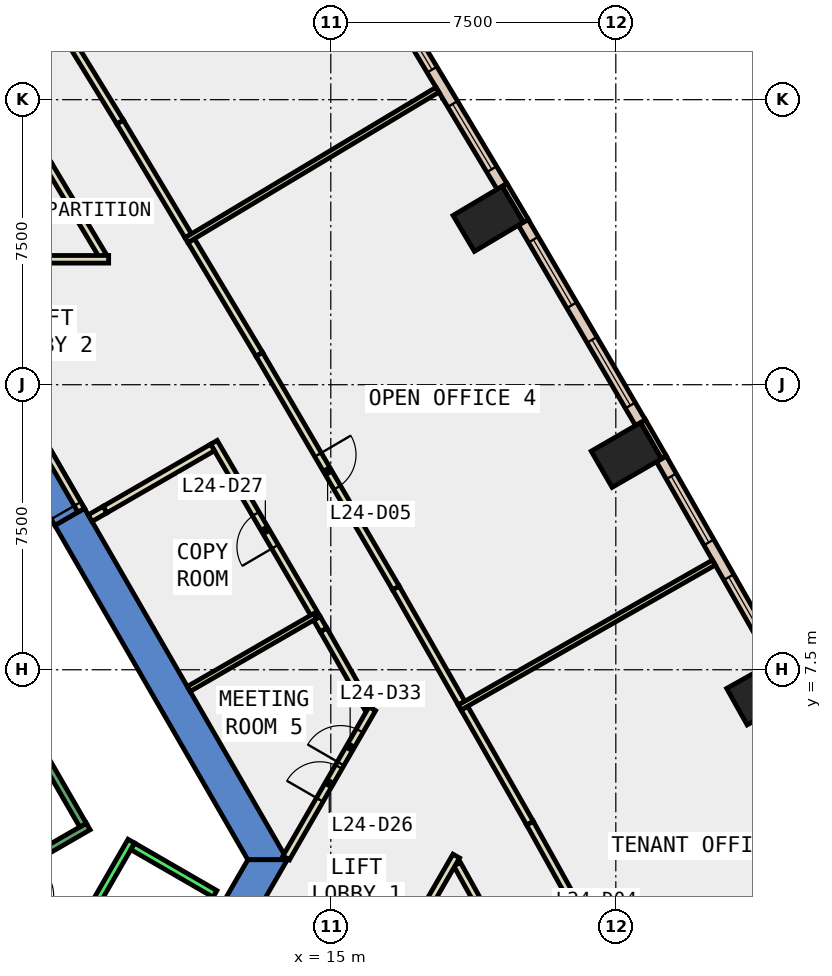
"""IFC4 building model, lengths in metres.
Left out: names, types, materials, properties, quantities, classifications, styles, units other than length and angle.
Written with IfcOpenShell. Run it as: python <this file> out.ifc"""

import sys

from ifc_helpers import new_model, si_unit, direction, frame, frame_2d, origin, origin_2d, place, context, subcontext, project, spatial, polyline, rectangle, outline, extrude, element, fill, save


model = new_model("IFC4")
c1 = context("Model", 3, precision=1e-05, world=origin(), true_north=direction((0.0, 1.0)))
c2 = subcontext(c1, "Body", "Model", "MODEL_VIEW")
j1 = project(units=[si_unit("LENGTHUNIT", "METRE"), si_unit("PLANEANGLEUNIT", "RADIAN")], contexts=[c1])
p1 = place(None, origin())
s1 = spatial("IfcSite", under=j1, at=p1, CompositionType="ELEMENT")
p2 = place(p1, origin())
s2 = spatial("IfcBuilding", under=s1, at=p2, CompositionType="ELEMENT")
p3 = place(p2, frame((0.0, 0.0, 111.8)))
s3 = spatial("IfcBuildingStorey", under=s2, at=p3, CompositionType="ELEMENT", Elevation=111.8)
for number, where, z_axis, x_axis in (
    (1, (26.341, 6.896, -0.4), (0.0, 0.0, 1.0), (-0.49, 0.872, 0.0)),
    (2, (22.777, 13.15, -0.4), (0.0, 0.0, 1.0), (-0.5, 0.866, 0.0)),
    (3, (19.143, 19.364, -0.4), (0.0, 0.0, 1.0), (-0.51, 0.86, 0.0)),
):
    element("IfcColumn", number, at=place(p3, frame(where, z_axis=z_axis, x_axis=x_axis)), inside=s3, PredefinedType="COLUMN", context=c2, shape_type="SweptSolid", body=[
        extrude(rectangle(XDim=1.1, YDim=1.5, at=origin_2d()), origin(), (0.0, 0.0, 1.0), 4.2),
    ])
p4 = place(p3, frame((0.0, 0.0, -0.4)))
e4 = element("IfcWall", 4, at=p4, inside=s3, PredefinedType="SHEAR", context=c2, shape_type="SweptSolid", body=[
    extrude(outline(polyline([(8.517, 11.748), (7.738, 11.298), (12.817, 2.5), (13.856, 2.5), (8.517, 11.748)])), origin(), (0.0, 0.0, 1.0), 4.2),
])
p5 = place(p3, frame((0.0, 0.0, 3.6)))
e5 = element("IfcWall", 5, at=p5, inside=s3, PredefinedType="SHEAR", context=c2, shape_type="SweptSolid", body=[
    extrude(outline(polyline([(7.517, 13.48), (6.738, 13.03), (7.738, 11.298), (8.517, 11.748), (7.517, 13.48)])), origin(), (0.0, 0.0, 1.0), 0.2),
])
p6 = place(p3, frame((0.0, 0.0, -0.4)))
e6 = element("IfcWall", 6, at=p6, inside=s3, PredefinedType="SHEAR", context=c2, shape_type="SweptSolid", body=[
    extrude(outline(polyline([(11.888, 0.89), (12.667, 0.44), (13.856, 2.5), (12.817, 2.5), (11.888, 0.89)])), origin(), (0.0, 0.0, 1.0), 4.2),
])
p7 = place(p3, frame((23.766, 13.086, 0.0), z_axis=(0.0, 0.0, 1.0), x_axis=(-0.499837685251, 0.86611909597, 0.0)))
e7 = element("IfcWall", 7, at=p7, inside=s3, PredefinedType="STANDARD", context=c2, shape_type="SweptSolid", body=[
    extrude(rectangle(XDim=1.1, YDim=0.15, at=frame_2d((0.55, 0.0))), origin(), (0.0, 0.0, 1.0), 3.8),
])
p8 = place(p3, frame((20.133, 19.312, 0.0), z_axis=(0.0, 0.0, 1.0), x_axis=(-0.510082245696, 0.860125631885, 0.0)))
e8 = element("IfcWall", 8, at=p8, inside=s3, PredefinedType="STANDARD", context=c2, shape_type="SweptSolid", body=[
    extrude(rectangle(XDim=1.1, YDim=0.15, at=frame_2d((0.55, 0.0))), origin(), (0.0, 0.0, 1.0), 3.8),
])
p9 = place(p3, frame((26.723, 7.74, 0.0), z_axis=(0.0, 0.0, 1.0), x_axis=(-0.495114366991, 0.868827810098, 0.0)))
e9 = element("IfcWall", 9, at=p9, inside=s3, PredefinedType="STANDARD", context=c2, shape_type="SweptSolid", body=[
    extrude(rectangle(XDim=6.11, YDim=0.3, at=frame_2d((3.055, 0.0))), origin(), (0.0, 0.0, 1.0), 3.8),
])
p10 = place(p9, frame((0.527, 0.0, 0.9)))
e10 = element("IfcOpeningElement", 10, at=p10, cuts=e9, PredefinedType="OPENING", context=c2, shape_type="SweptSolid", body=[
    extrude(rectangle(XDim=2.0, YDim=2.6, at=frame_2d((1.0, 1.3))), frame((0.0, 0.16, 0.0), z_axis=(0.0, -1.0, 0.0), x_axis=(1.0, 0.0, 0.0)), (0.0, 0.0, 1.0), 0.32),
])
p11 = place(p9, frame((3.582, 0.0, 0.9)))
e11 = element("IfcOpeningElement", 11, at=p11, cuts=e9, PredefinedType="OPENING", context=c2, shape_type="SweptSolid", body=[
    extrude(rectangle(XDim=2.0, YDim=2.6, at=frame_2d((1.0, 1.3))), frame((0.0, 0.16, 0.0), z_axis=(0.0, -1.0, 0.0), x_axis=(1.0, 0.0, 0.0)), (0.0, 0.0, 1.0), 0.32),
])
p12 = place(p3, frame((23.149, 13.999, 0.0), z_axis=(0.0, 0.0, 1.0), x_axis=(-0.504790055126, 0.863242144619, 0.0)))
e12 = element("IfcWall", 12, at=p12, inside=s3, PredefinedType="STANDARD", context=c2, shape_type="SweptSolid", body=[
    extrude(rectangle(XDim=6.109, YDim=0.3, at=frame_2d((3.055, 0.0))), origin(), (0.0, 0.0, 1.0), 3.8),
])
p13 = place(p12, frame((0.527, 0.0, 0.9)))
e13 = element("IfcOpeningElement", 13, at=p13, cuts=e12, PredefinedType="OPENING", context=c2, shape_type="SweptSolid", body=[
    extrude(rectangle(XDim=2.0, YDim=2.6, at=frame_2d((1.0, 1.3))), frame((0.0, 0.16, 0.0), z_axis=(0.0, -1.0, 0.0), x_axis=(1.0, 0.0, 0.0)), (0.0, 0.0, 1.0), 0.32),
])
p14 = place(p12, frame((3.582, 0.0, 0.9)))
e14 = element("IfcOpeningElement", 14, at=p14, cuts=e12, PredefinedType="OPENING", context=c2, shape_type="SweptSolid", body=[
    extrude(rectangle(XDim=2.0, YDim=2.6, at=frame_2d((1.0, 1.3))), frame((0.0, 0.16, 0.0), z_axis=(0.0, -1.0, 0.0), x_axis=(1.0, 0.0, 0.0)), (0.0, 0.0, 1.0), 0.32),
])
p15 = place(p3, frame((19.506, 20.217, 0.0), z_axis=(0.0, 0.0, 1.0), x_axis=(-0.514078503149, 0.857743139057, 0.0)))
e15 = element("IfcWall", 15, at=p15, inside=s3, PredefinedType="STANDARD", context=c2, shape_type="SweptSolid", body=[
    extrude(rectangle(XDim=6.11, YDim=0.3, at=frame_2d((3.055, 0.0))), origin(), (0.0, 0.0, 1.0), 3.8),
])
p16 = place(p15, frame((0.528, 0.0, 0.9)))
e16 = element("IfcOpeningElement", 16, at=p16, cuts=e15, PredefinedType="OPENING", context=c2, shape_type="SweptSolid", body=[
    extrude(rectangle(XDim=2.0, YDim=2.6, at=frame_2d((1.0, 1.3))), frame((0.0, 0.16, 0.0), z_axis=(0.0, -1.0, 0.0), x_axis=(1.0, 0.0, 0.0)), (0.0, 0.0, 1.0), 0.32),
])
p17 = place(p15, frame((3.583, 0.0, 0.9)))
e17 = element("IfcOpeningElement", 17, at=p17, cuts=e15, PredefinedType="OPENING", context=c2, shape_type="SweptSolid", body=[
    extrude(rectangle(XDim=2.0, YDim=2.6, at=frame_2d((1.0, 1.3))), frame((0.0, 0.16, 0.0), z_axis=(0.0, -1.0, 0.0), x_axis=(1.0, 0.0, 0.0)), (0.0, 0.0, 1.0), 0.32),
])
p18 = place(p3, frame((15.993, 6.473, 0.0), z_axis=(0.0, 0.0, 1.0), x_axis=(-0.495159881733, 0.86880187127, 0.0)))
e18 = element("IfcWall", 18, at=p18, inside=s3, PredefinedType="PARTITIONING", context=c2, shape_type="SweptSolid", body=[
    extrude(rectangle(XDim=2.391, YDim=0.2, at=frame_2d((1.195, 0.0))), origin(), (0.0, 0.0, 1.0), 3.8),
])
p19 = place(p3, frame((14.809, 8.55, 0.0), z_axis=(0.0, 0.0, 1.0), x_axis=(-0.50443330283, 0.86345066043, 0.0)))
e19 = element("IfcWall", 19, at=p19, inside=s3, PredefinedType="PARTITIONING", context=c2, shape_type="SweptSolid", body=[
    extrude(rectangle(XDim=0.351, YDim=0.2, at=frame_2d((0.175, 0.0))), origin(), (0.0, 0.0, 1.0), 3.8),
])
p20 = place(p3, frame((14.632, 8.853, 0.0), z_axis=(0.0, 0.0, 1.0), x_axis=(-0.504798859257, 0.863236996249, 0.0)))
e20 = element("IfcWall", 20, at=p20, inside=s3, PredefinedType="PARTITIONING", context=c2, shape_type="SweptSolid", body=[
    extrude(rectangle(XDim=5.365, YDim=0.2, at=frame_2d((2.682, 0.0))), origin(), (0.0, 0.0, 1.0), 3.8),
])
p21 = place(p20, frame((2.182, 0.0, 0.0)))
e21 = element("IfcOpeningElement", 21, at=p21, cuts=e20, PredefinedType="OPENING", context=c2, shape_type="SweptSolid", body=[
    extrude(rectangle(XDim=1.0, YDim=2.1, at=frame_2d((0.5, 1.05))), frame((0.0, 0.11, 0.0), z_axis=(0.0, -1.0, 0.0), x_axis=(1.0, 0.0, 0.0)), (0.0, 0.0, 1.0), 0.22),
])
p22 = place(p3, frame((11.888, 13.348, 0.0), z_axis=(0.0, 0.0, 1.0), x_axis=(-0.865959227195, -0.500114603702, 0.0)))
e22 = element("IfcWall", 22, at=p22, inside=s3, PredefinedType="PARTITIONING", context=c2, shape_type="SweptSolid", body=[
    extrude(rectangle(XDim=3.269, YDim=0.2, at=frame_2d((1.635, 0.0))), origin(), (0.0, 0.0, 1.0), 3.8),
])
p23 = place(p3, frame((9.003, 18.386, 0.0), z_axis=(0.0, 0.0, 1.0), x_axis=(-0.513900868925, 0.857849577092, 0.0)))
e23 = element("IfcWall", 23, at=p23, inside=s3, PredefinedType="PARTITIONING", context=c2, shape_type="SweptSolid", body=[
    extrude(rectangle(XDim=2.777, YDim=0.2, at=frame_2d((1.388, 0.0))), origin(), (0.0, 0.0, 1.0), 3.8),
])
p24 = place(p3, frame((21.773, -3.822, 0.0), z_axis=(0.0, 0.0, 1.0), x_axis=(-0.485826874234, 0.874055060206, 0.0)))
e24 = element("IfcWall", 24, at=p24, inside=s3, PredefinedType="PARTITIONING", context=c2, shape_type="SweptSolid", body=[
    extrude(rectangle(XDim=7.099, YDim=0.2, at=frame_2d((3.55, 0.0))), origin(), (0.0, 0.0, 1.0), 3.8),
])
p25 = place(p3, frame((18.515, 6.491, 0.0), z_axis=(0.0, 0.0, 1.0), x_axis=(0.495309264725, -0.868716715781, 0.0)))
e25 = element("IfcWall", 25, at=p25, inside=s3, PredefinedType="PARTITIONING", context=c2, shape_type="SweptSolid", body=[
    extrude(rectangle(XDim=3.487, YDim=0.2, at=frame_2d((1.743, 0.0))), origin(), (0.0, 0.0, 1.0), 3.8),
])
p26 = place(p3, frame((20.242, 3.462, 0.0), z_axis=(0.0, 0.0, 1.0), x_axis=(0.485742937917, -0.874101709336, 0.0)))
e26 = element("IfcWall", 26, at=p26, inside=s3, PredefinedType="PARTITIONING", context=c2, shape_type="SweptSolid", body=[
    extrude(rectangle(XDim=7.047, YDim=0.2, at=frame_2d((3.523, 0.0))), origin(), (0.0, 0.0, 1.0), 3.8),
])
p27 = place(p26, frame((3.099, 0.0, 0.0)))
e27 = element("IfcOpeningElement", 27, at=p27, cuts=e26, PredefinedType="OPENING", context=c2, shape_type="SweptSolid", body=[
    extrude(rectangle(XDim=1.0, YDim=2.1, at=frame_2d((0.5, 1.05))), frame((0.0, 0.11, 0.0), z_axis=(0.0, -1.0, 0.0), x_axis=(1.0, 0.0, 0.0)), (0.0, 0.0, 1.0), 0.22),
])
p28 = place(p3, frame((11.326, 18.79, 0.0), z_axis=(0.0, 0.0, 1.0), x_axis=(0.514155958966, -0.857696712049, 0.0)))
e28 = element("IfcWall", 28, at=p28, inside=s3, PredefinedType="PARTITIONING", context=c2, shape_type="SweptSolid", body=[
    extrude(rectangle(XDim=3.487, YDim=0.2, at=frame_2d((1.744, 0.0))), origin(), (0.0, 0.0, 1.0), 3.8),
])
p29 = place(p3, frame((13.119, 15.799, 0.0), z_axis=(0.0, 0.0, 1.0), x_axis=(0.504729598075, -0.863277494684, 0.0)))
e29 = element("IfcWall", 29, at=p29, inside=s3, PredefinedType="PARTITIONING", context=c2, shape_type="SweptSolid", body=[
    extrude(rectangle(XDim=7.123, YDim=0.2, at=frame_2d((3.562, 0.0))), origin(), (0.0, 0.0, 1.0), 3.8),
])
p30 = place(p29, frame((3.061, 0.0, 0.0)))
e30 = element("IfcOpeningElement", 30, at=p30, cuts=e29, PredefinedType="OPENING", context=c2, shape_type="SweptSolid", body=[
    extrude(rectangle(XDim=1.0, YDim=2.1, at=frame_2d((0.5, 1.05))), frame((0.0, 0.11, 0.0), z_axis=(0.0, -1.0, 0.0), x_axis=(1.0, 0.0, 0.0)), (0.0, 0.0, 1.0), 0.22),
])
p31 = place(p3, frame((16.714, 9.65, 0.0), z_axis=(0.0, 0.0, 1.0), x_axis=(0.495286549488, -0.868729666753, 0.0)))
e31 = element("IfcWall", 31, at=p31, inside=s3, PredefinedType="PARTITIONING", context=c2, shape_type="SweptSolid", body=[
    extrude(rectangle(XDim=3.487, YDim=0.2, at=frame_2d((1.743, 0.0))), origin(), (0.0, 0.0, 1.0), 3.8),
])
p32 = place(p3, frame((5.69, 28.042, 0.0), z_axis=(0.0, 0.0, 1.0), x_axis=(0.523381868706, -0.852098245222, 0.0)))
e32 = element("IfcWall", 32, at=p32, inside=s3, PredefinedType="PARTITIONING", context=c2, shape_type="SweptSolid", body=[
    extrude(rectangle(XDim=7.198, YDim=0.2, at=frame_2d((3.599, 0.0))), origin(), (0.0, 0.0, 1.0), 3.8),
])
p33 = place(p32, frame((3.099, 0.0, 0.0)))
e33 = element("IfcOpeningElement", 33, at=p33, cuts=e32, PredefinedType="OPENING", context=c2, shape_type="SweptSolid", body=[
    extrude(rectangle(XDim=1.0, YDim=2.1, at=frame_2d((0.5, 1.05))), frame((0.0, 0.11, 0.0), z_axis=(0.0, -1.0, 0.0), x_axis=(1.0, 0.0, 0.0)), (0.0, 0.0, 1.0), 0.22),
])
p34 = place(p3, frame((9.457, 21.909, 0.0), z_axis=(0.0, 0.0, 1.0), x_axis=(0.513949903813, -0.857820200491, 0.0)))
e34 = element("IfcWall", 34, at=p34, inside=s3, PredefinedType="PARTITIONING", context=c2, shape_type="SweptSolid", body=[
    extrude(rectangle(XDim=3.487, YDim=0.2, at=frame_2d((1.743, 0.0))), origin(), (0.0, 0.0, 1.0), 3.8),
])
p35 = place(p3, frame((6.25, 1.894, 0.0), z_axis=(0.0, 0.0, 1.0), x_axis=(0.866043184279, -0.499969202016, 0.0)))
e35 = element("IfcWall", 35, at=p35, inside=s3, PredefinedType="PARTITIONING", context=c2, shape_type="SweptSolid", body=[
    extrude(rectangle(XDim=2.084, YDim=0.2, at=frame_2d((1.042, 0.0))), origin(), (0.0, 0.0, 1.0), 3.8),
])
p36 = place(p35, frame((0.642, 0.0, 0.0)))
e36 = element("IfcOpeningElement", 36, at=p36, cuts=e35, PredefinedType="OPENING", context=c2, shape_type="SweptSolid", body=[
    extrude(rectangle(XDim=0.9, YDim=2.1, at=frame_2d((0.45, 1.05))), frame((0.0, 0.11, 0.0), z_axis=(0.0, -1.0, 0.0), x_axis=(1.0, 0.0, 0.0)), (0.0, 0.0, 1.0), 0.22),
])
p37 = place(p3, frame((11.261, 6.994, 0.0), z_axis=(0.0, 0.0, 1.0), x_axis=(0.86605248387, 0.499953092981, 0.0)))
e37 = element("IfcWall", 37, at=p37, inside=s3, PredefinedType="PARTITIONING", context=c2, shape_type="SweptSolid", body=[
    extrude(rectangle(XDim=3.848, YDim=0.15, at=frame_2d((1.924, 0.0))), origin(), (0.0, 0.0, 1.0), 3.8),
])
p38 = place(p3, frame((13.827, 2.55, 0.0), z_axis=(0.0, 0.0, 1.0), x_axis=(0.500045913515, 0.865998893981, 0.0)))
e38 = element("IfcWall", 38, at=p38, inside=s3, PredefinedType="PARTITIONING", context=c2, shape_type="SweptSolid", body=[
    extrude(rectangle(XDim=4.53, YDim=0.2, at=frame_2d((2.265, 0.0))), origin(), (0.0, 0.0, 1.0), 3.8),
])
p39 = place(p38, frame((1.765, 0.0, 0.0)))
e39 = element("IfcOpeningElement", 39, at=p39, cuts=e38, PredefinedType="OPENING", context=c2, shape_type="SweptSolid", body=[
    extrude(rectangle(XDim=1.0, YDim=2.1, at=frame_2d((0.5, 1.05))), frame((0.0, 0.11, 0.0), z_axis=(0.0, -1.0, 0.0), x_axis=(1.0, 0.0, 0.0)), (0.0, 0.0, 1.0), 0.22),
])
p40 = place(p38, frame((2.865, 0.0, 0.0)))
e40 = element("IfcOpeningElement", 40, at=p40, cuts=e38, PredefinedType="OPENING", context=c2, shape_type="SweptSolid", body=[
    extrude(rectangle(XDim=1.0, YDim=2.1, at=frame_2d((0.5, 1.05))), frame((0.0, 0.11, 0.0), z_axis=(0.0, -1.0, 0.0), x_axis=(1.0, 0.0, 0.0)), (0.0, 0.0, 1.0), 0.22),
])
p41 = place(p3, frame((0.4, 18.3, 0.0), z_axis=(0.0, 0.0, 1.0), x_axis=(1.0, 0.0, 0.0)))
e41 = element("IfcWall", 41, at=p41, inside=s3, PredefinedType="PARTITIONING", context=c2, shape_type="SweptSolid", body=[
    extrude(rectangle(XDim=8.755, YDim=0.2, at=frame_2d((4.377, 0.0))), origin(), (0.0, 0.0, 1.0), 3.8),
])
p42 = place(p3, frame((18.301, 2.598, 0.0), z_axis=(0.0, 0.0, 1.0), x_axis=(-0.49997732567, -0.866038494419, 0.0)))
e42 = element("IfcWall", 42, at=p42, inside=s3, PredefinedType="PARTITIONING", context=c2, shape_type="SweptSolid", body=[
    extrude(rectangle(XDim=11.0, YDim=0.2, at=frame_2d((5.5, 0.0))), origin(), (0.0, 0.0, 1.0), 3.8),
])
p43 = place(p3, frame((18.391, 6.506, 0.0), z_axis=(0.0, 0.0, 1.0), x_axis=(0.868738258528, 0.495271479261, 0.0)))
e43 = element("IfcWall", 43, at=p43, inside=s3, PredefinedType="PARTITIONING", context=c2, shape_type="SweptSolid", body=[
    extrude(rectangle(XDim=7.701, YDim=0.15, at=frame_2d((3.85, 0.0))), origin(), (0.0, 0.0, 1.0), 3.8),
])
p44 = place(p3, frame((11.202, 18.803, 0.0), z_axis=(0.0, 0.0, 1.0), x_axis=(0.857778149162, 0.514020084062, 0.0)))
e44 = element("IfcWall", 44, at=p44, inside=s3, PredefinedType="PARTITIONING", context=c2, shape_type="SweptSolid", body=[
    extrude(rectangle(XDim=7.7, YDim=0.15, at=frame_2d((3.85, 0.0))), origin(), (0.0, 0.0, 1.0), 3.8),
])
p45 = place(p3, frame((8.43, 11.698, 0.0), z_axis=(0.0, 0.0, 1.0), x_axis=(-0.50002537861, 0.866010750942, 0.0)))
e45 = element("IfcWall", 45, at=p45, inside=s3, PredefinedType="PARTITIONING", context=c2, shape_type="SweptSolid", body=[
    extrude(rectangle(XDim=2.0, YDim=0.2, at=frame_2d((1.0, 0.0))), origin(), (0.0, 0.0, 1.0), 2.4),
])
p46 = place(p45, frame((0.19, 0.0, 0.0)))
e46 = element("IfcOpeningElement", 46, at=p46, cuts=e45, PredefinedType="OPENING", context=c2, shape_type="SweptSolid", body=[
    extrude(rectangle(XDim=1.8, YDim=2.1, at=frame_2d((0.9, 1.05))), frame((0.0, 0.11, 0.0), z_axis=(0.0, -1.0, 0.0), x_axis=(1.0, 0.0, 0.0)), (0.0, 0.0, 1.0), 0.22),
])
p47 = place(p3, frame((9.057, 11.713, 0.0), z_axis=(0.0, 0.0, 1.0), x_axis=(-0.866266849364, -0.49958157061, 0.0)))
e47 = element("IfcWall", 47, at=p47, inside=s3, PredefinedType="PARTITIONING", context=c2, shape_type="SweptSolid", body=[
    extrude(rectangle(XDim=0.45, YDim=0.2, at=frame_2d((0.225, 0.0))), origin(), (0.0, 0.0, 1.0), 2.4),
])
p48 = place(p3, frame((4.451, -6.19, 0.0), z_axis=(0.0, 0.0, 1.0), x_axis=(0.50000090737, 0.866024879913, 0.0)))
e48 = element("IfcWall", 48, at=p48, inside=s3, PredefinedType="STANDARD", context=c2, shape_type="SweptSolid", body=[
    extrude(rectangle(XDim=10.6, YDim=0.2, at=frame_2d((5.3, 0.0))), origin(), (0.0, 0.0, 1.0), 3.8),
])
p49 = place(p3, frame((9.788, 2.853, 0.0), z_axis=(0.0, 0.0, 1.0), x_axis=(0.865998541277, -0.500046524342, 0.0)))
e49 = element("IfcWall", 49, at=p49, inside=s3, PredefinedType="STANDARD", context=c2, shape_type="SweptSolid", body=[
    extrude(rectangle(XDim=2.5, YDim=0.2, at=frame_2d((1.25, 0.0))), origin(), (0.0, 0.0, 1.0), 3.8),
])
p50 = place(p3, frame((4.806, 1.176, 0.0), z_axis=(0.0, 0.0, 1.0), x_axis=(0.866059941101, 0.499940174841, 0.0)))
e50 = element("IfcWall", 50, at=p50, inside=s3, PredefinedType="STANDARD", context=c2, shape_type="SweptSolid", body=[
    extrude(rectangle(XDim=4.4, YDim=0.2, at=frame_2d((2.2, 0.0))), origin(), (0.0, 0.0, 1.0), 3.8),
])
p51 = place(p50, frame((1.65, 0.0, 0.0)))
e51 = element("IfcOpeningElement", 51, at=p51, cuts=e50, PredefinedType="OPENING", context=c2, shape_type="SweptSolid", body=[
    extrude(rectangle(XDim=1.1, YDim=2.2, at=frame_2d((0.55, 1.1))), frame((0.0, 0.11, 0.0), z_axis=(0.0, -1.0, 0.0), x_axis=(1.0, 0.0, 0.0)), (0.0, 0.0, 1.0), 0.22),
])
p52 = place(p3, frame((8.48, 3.412, 0.0), z_axis=(0.0, 0.0, 1.0), x_axis=(-0.499978703459, 0.866037698999, 0.0)))
e52 = element("IfcWall", 52, at=p52, inside=s3, PredefinedType="STANDARD", context=c2, shape_type="SweptSolid", body=[
    extrude(rectangle(XDim=6.9, YDim=0.2, at=frame_2d((3.45, 0.0))), origin(), (0.0, 0.0, 1.0), 3.8),
])
p53 = place(p10, origin())
e53 = element("IfcWindow", 53, at=p53, inside=s3, PartitioningType="SINGLE_PANEL", PredefinedType="WINDOW", context=c2, shape_type="SweptSolid", body=[
    extrude(rectangle(XDim=2.0, YDim=2.6, at=frame_2d((1.0, 1.3))), frame((0.0, 0.03, 0.0), z_axis=(0.0, -1.0, 0.0), x_axis=(1.0, 0.0, 0.0)), (0.0, 0.0, 1.0), 0.06),
])
fill(e10, e53)
p54 = place(p11, origin())
e54 = element("IfcWindow", 54, at=p54, inside=s3, PartitioningType="SINGLE_PANEL", PredefinedType="WINDOW", context=c2, shape_type="SweptSolid", body=[
    extrude(rectangle(XDim=2.0, YDim=2.6, at=frame_2d((1.0, 1.3))), frame((0.0, 0.03, 0.0), z_axis=(0.0, -1.0, 0.0), x_axis=(1.0, 0.0, 0.0)), (0.0, 0.0, 1.0), 0.06),
])
fill(e11, e54)
p55 = place(p13, origin())
e55 = element("IfcWindow", 55, at=p55, inside=s3, PartitioningType="SINGLE_PANEL", PredefinedType="WINDOW", context=c2, shape_type="SweptSolid", body=[
    extrude(rectangle(XDim=2.0, YDim=2.6, at=frame_2d((1.0, 1.3))), frame((0.0, 0.03, 0.0), z_axis=(0.0, -1.0, 0.0), x_axis=(1.0, 0.0, 0.0)), (0.0, 0.0, 1.0), 0.06),
])
fill(e13, e55)
p56 = place(p14, origin())
e56 = element("IfcWindow", 56, at=p56, inside=s3, PartitioningType="SINGLE_PANEL", PredefinedType="WINDOW", context=c2, shape_type="SweptSolid", body=[
    extrude(rectangle(XDim=2.0, YDim=2.6, at=frame_2d((1.0, 1.3))), frame((0.0, 0.03, 0.0), z_axis=(0.0, -1.0, 0.0), x_axis=(1.0, 0.0, 0.0)), (0.0, 0.0, 1.0), 0.06),
])
fill(e14, e56)
p57 = place(p16, origin())
e57 = element("IfcWindow", 57, at=p57, inside=s3, PartitioningType="SINGLE_PANEL", PredefinedType="WINDOW", context=c2, shape_type="SweptSolid", body=[
    extrude(rectangle(XDim=2.0, YDim=2.6, at=frame_2d((1.0, 1.3))), frame((0.0, 0.03, 0.0), z_axis=(0.0, -1.0, 0.0), x_axis=(1.0, 0.0, 0.0)), (0.0, 0.0, 1.0), 0.06),
])
fill(e16, e57)
p58 = place(p17, origin())
e58 = element("IfcWindow", 58, at=p58, inside=s3, PartitioningType="SINGLE_PANEL", PredefinedType="WINDOW", context=c2, shape_type="SweptSolid", body=[
    extrude(rectangle(XDim=2.0, YDim=2.6, at=frame_2d((1.0, 1.3))), frame((0.0, 0.03, 0.0), z_axis=(0.0, -1.0, 0.0), x_axis=(1.0, 0.0, 0.0)), (0.0, 0.0, 1.0), 0.06),
])
fill(e17, e58)
p59 = place(p30, origin())
e59 = element("IfcDoor", 59, at=p59, inside=s3, OperationType="SINGLE_SWING_RIGHT", PredefinedType="DOOR", context=c2, shape_type="SweptSolid", body=[
    extrude(rectangle(XDim=1.0, YDim=2.1, at=frame_2d((0.5, 1.05))), frame((0.0, 0.025, 0.0), z_axis=(0.0, -1.0, 0.0), x_axis=(1.0, 0.0, 0.0)), (0.0, 0.0, 1.0), 0.05),
])
fill(e30, e59)
p60 = place(p39, origin())
e60 = element("IfcDoor", 60, at=p60, inside=s3, OperationType="SINGLE_SWING_LEFT", PredefinedType="DOOR", context=c2, shape_type="SweptSolid", body=[
    extrude(rectangle(XDim=1.0, YDim=2.1, at=frame_2d((0.5, 1.05))), frame((0.0, 0.025, 0.0), z_axis=(0.0, -1.0, 0.0), x_axis=(1.0, 0.0, 0.0)), (0.0, 0.0, 1.0), 0.05),
])
fill(e39, e60)
p61 = place(p21, origin())
e61 = element("IfcDoor", 61, at=p61, inside=s3, OperationType="SINGLE_SWING_LEFT", PredefinedType="DOOR", context=c2, shape_type="SweptSolid", body=[
    extrude(rectangle(XDim=1.0, YDim=2.1, at=frame_2d((0.5, 1.05))), frame((0.0, 0.025, 0.0), z_axis=(0.0, -1.0, 0.0), x_axis=(1.0, 0.0, 0.0)), (0.0, 0.0, 1.0), 0.05),
])
fill(e21, e61)
p62 = place(p40, origin())
e62 = element("IfcDoor", 62, at=p62, inside=s3, OperationType="SINGLE_SWING_RIGHT", PredefinedType="DOOR", context=c2, shape_type="SweptSolid", body=[
    extrude(rectangle(XDim=1.0, YDim=2.1, at=frame_2d((0.5, 1.05))), frame((0.0, 0.025, 0.0), z_axis=(0.0, -1.0, 0.0), x_axis=(1.0, 0.0, 0.0)), (0.0, 0.0, 1.0), 0.05),
])
fill(e40, e62)
p63 = place(p46, origin())
e63 = element("IfcDoor", 63, at=p63, inside=s3, OperationType="DOUBLE_DOOR_SINGLE_SWING", PredefinedType="DOOR", context=c2, shape_type="SweptSolid", body=[
    extrude(rectangle(XDim=1.8, YDim=2.1, at=frame_2d((0.9, 1.05))), frame((0.0, 0.025, 0.0), z_axis=(0.0, -1.0, 0.0), x_axis=(1.0, 0.0, 0.0)), (0.0, 0.0, 1.0), 0.05),
])
fill(e46, e63)
save(model, sys.argv[1])
